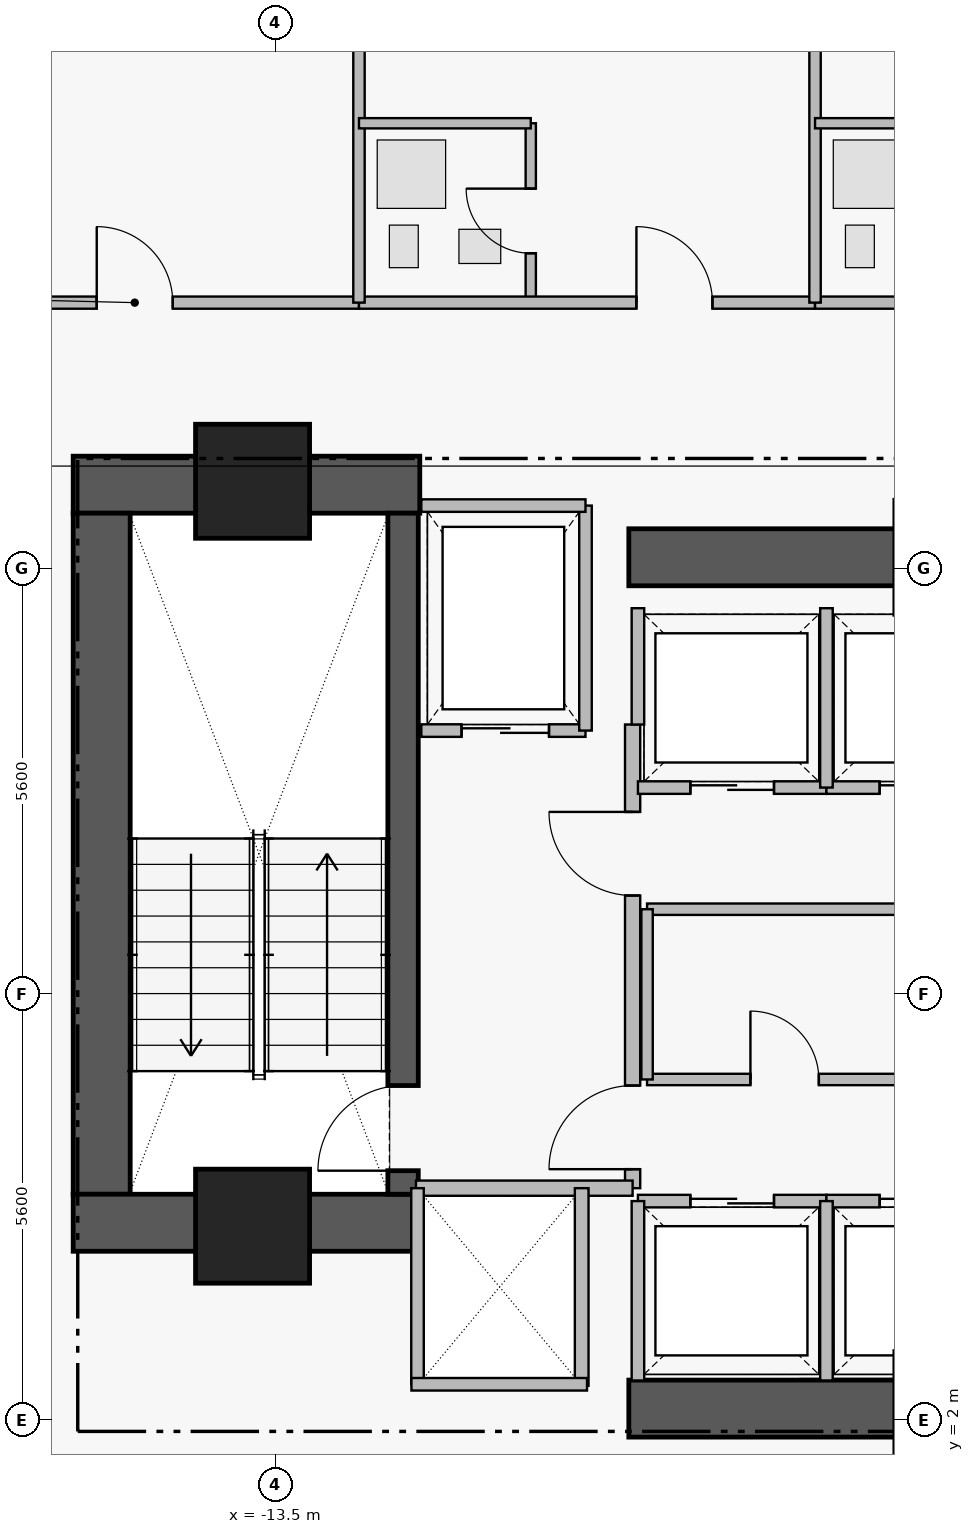
"""IFC4 building model, lengths in metres.
Left out: names, types, materials, properties, quantities, classifications, styles, units other than length and angle.
Written with IfcOpenShell. Run it as: python <this file> out.ifc"""

import sys

from ifc_helpers import new_model, si_unit, direction, frame, frame_2d, origin, origin_2d, place, context, subcontext, project, spatial, rectangle, extrude, element, fill, save


model = new_model("IFC4")
c1 = context("Model", 3, precision=1e-05, world=origin(), true_north=direction((0.0, 1.0)))
c2 = subcontext(c1, "Body", "Model", "MODEL_VIEW")
j1 = project(units=[si_unit("LENGTHUNIT", "METRE"), si_unit("PLANEANGLEUNIT", "RADIAN")], contexts=[c1])
p1 = place(None, origin())
s1 = spatial("IfcSite", under=j1, at=p1, CompositionType="ELEMENT")
p2 = place(p1, origin())
s2 = spatial("IfcBuilding", under=s1, at=p2, CompositionType="ELEMENT")
p3 = place(p2, frame((0.0, 0.0, 95.65)))
s3 = spatial("IfcBuildingStorey", under=s2, at=p3, CompositionType="ELEMENT", Elevation=95.65)
p4 = place(p3, frame((-16.16, 14.305, 0.0), z_axis=(0.0, 0.0, 1.0), x_axis=(1.0, 0.0, 0.0)))
e1 = element("IfcWall", 1, at=p4, inside=s3, PredefinedType="SHEAR", context=c2, shape_type="SweptSolid", body=[
    extrude(rectangle(XDim=4.56, YDim=0.75, at=frame_2d((2.28, 0.0))), origin(), (0.0, 0.0, 1.0), 3.46),
])
p5 = place(p3, frame((-15.785, 4.97, 0.0), z_axis=(0.0, 0.0, 1.0), x_axis=(0.0, 1.0, 0.0)))
e2 = element("IfcWall", 2, at=p5, inside=s3, PredefinedType="SHEAR", context=c2, shape_type="SweptSolid", body=[
    extrude(rectangle(XDim=8.96, YDim=0.75, at=frame_2d((4.48, 0.0))), origin(), (0.0, 0.0, 1.0), 3.46),
])
p6 = place(p3, frame((-16.16, 4.595, 0.0), z_axis=(0.0, 0.0, 1.0), x_axis=(1.0, 0.0, 0.0)))
e3 = element("IfcWall", 3, at=p6, inside=s3, PredefinedType="SHEAR", context=c2, shape_type="SweptSolid", body=[
    extrude(rectangle(XDim=4.56, YDim=0.75, at=frame_2d((2.28, 0.0))), origin(), (0.0, 0.0, 1.0), 3.46),
])
for number, where, z_axis, x_axis in (
    (4, (-8.85, 2.15, 0.0), (0.0, 0.0, 1.0), (1.0, 0.0, 0.0)),
    (5, (-8.85, 13.35, 0.0), (0.0, 0.0, 1.0), (1.0, 0.0, 0.0)),
):
    element("IfcWall", number, at=place(p3, frame(where, z_axis=z_axis, x_axis=x_axis)), inside=s3, PredefinedType="SHEAR", context=c2, shape_type="SweptSolid", body=[
        extrude(rectangle(XDim=7.6, YDim=0.75, at=frame_2d((3.8, 0.0))), origin(), (0.0, 0.0, 1.0), 3.43),
    ])
p7 = place(p3, frame((-11.82, 4.97, 0.0), z_axis=(0.0, 0.0, 1.0), x_axis=(0.0, 1.0, 0.0)))
e6 = element("IfcWall", 6, at=p7, inside=s3, PredefinedType="SHEAR", context=c2, shape_type="SweptSolid", body=[
    extrude(rectangle(XDim=8.96, YDim=0.4, at=frame_2d((4.48, 0.0))), origin(), (0.0, 0.0, 1.0), 3.46),
])
p8 = place(p7, frame((0.31, 0.0, 0.0)))
e7 = element("IfcOpeningElement", 7, at=p8, cuts=e6, PredefinedType="OPENING", context=c2, shape_type="SweptSolid", body=[
    extrude(rectangle(XDim=1.12, YDim=2.22, at=frame_2d((0.56, 1.11))), frame((0.0, 0.21, 0.0), z_axis=(0.0, -1.0, 0.0), x_axis=(1.0, 0.0, 0.0)), (0.0, 0.0, 1.0), 0.42),
])
for number, where, z_axis, x_axis in (
    (8, (-13.8, 14.35, 0.0), (0.0, 0.0, 1.0), (1.0, 0.0, 0.0)),
    (9, (-13.8, 4.55, 0.0), (0.0, 0.0, 1.0), (1.0, 0.0, 0.0)),
):
    element("IfcColumn", number, at=place(p3, frame(where, z_axis=z_axis, x_axis=x_axis)), inside=s3, PredefinedType="COLUMN", context=c2, shape_type="SweptSolid", body=[
        extrude(rectangle(XDim=1.5, YDim=1.5, at=origin_2d()), origin(), (0.0, 0.0, 1.0), 3.65),
    ])
p9 = place(p3, frame((-8.8, 5.05, 0.0), z_axis=(0.0, 0.0, 1.0), x_axis=(0.0, 1.0, 0.0)))
e10 = element("IfcWall", 10, at=p9, inside=s3, PredefinedType="PARTITIONING", context=c2, shape_type="SweptSolid", body=[
    extrude(rectangle(XDim=6.1, YDim=0.2, at=frame_2d((3.05, 0.0))), origin(), (0.0, 0.0, 1.0), 3.43),
])
p10 = place(p9, frame((0.25, 0.0, 0.0)))
e11 = element("IfcOpeningElement", 11, at=p10, cuts=e10, PredefinedType="OPENING", context=c2, shape_type="SweptSolid", body=[
    extrude(rectangle(XDim=1.1, YDim=2.2, at=frame_2d((0.55, 1.1))), frame((0.0, 0.11, 0.0), z_axis=(0.0, -1.0, 0.0), x_axis=(1.0, 0.0, 0.0)), (0.0, 0.0, 1.0), 0.22),
])
p11 = place(p9, frame((3.85, 0.0, 0.0)))
e12 = element("IfcOpeningElement", 12, at=p11, cuts=e10, PredefinedType="OPENING", context=c2, shape_type="SweptSolid", body=[
    extrude(rectangle(XDim=1.1, YDim=2.2, at=frame_2d((0.55, 1.1))), frame((0.0, 0.11, 0.0), z_axis=(0.0, -1.0, 0.0), x_axis=(1.0, 0.0, 0.0)), (0.0, 0.0, 1.0), 0.22),
])
p12 = place(p3, frame((-11.58, 11.07, 0.0), z_axis=(0.0, 0.0, 1.0), x_axis=(1.0, 0.0, 0.0)))
e13 = element("IfcWall", 13, at=p12, inside=s3, PredefinedType="PARTITIONING", context=c2, shape_type="SweptSolid", body=[
    extrude(rectangle(XDim=2.16, YDim=0.165, at=frame_2d((1.08, 0.0))), origin(), (0.0, 0.0, 1.0), 3.43),
])
p13 = place(p12, frame((0.53, 0.0, 0.0)))
e14 = element("IfcOpeningElement", 14, at=p13, cuts=e13, PredefinedType="OPENING", context=c2, shape_type="SweptSolid", body=[
    extrude(rectangle(XDim=1.15, YDim=2.25, at=frame_2d((0.575, 1.125))), frame((0.0, 0.093, 0.0), z_axis=(0.0, -1.0, 0.0), x_axis=(1.0, 0.0, 0.0)), (0.0, 0.0, 1.0), 0.185),
])
p14 = place(p3, frame((-8.73, 4.88, 0.0), z_axis=(0.0, 0.0, 1.0), x_axis=(1.0, 0.0, 0.0)))
e15 = element("IfcWall", 15, at=p14, inside=s3, PredefinedType="PARTITIONING", context=c2, shape_type="SweptSolid", body=[
    extrude(rectangle(XDim=2.48, YDim=0.165, at=frame_2d((1.24, 0.0))), origin(), (0.0, 0.0, 1.0), 3.43),
])
p15 = place(p14, frame((0.69, 0.0, 0.0)))
e16 = element("IfcOpeningElement", 16, at=p15, cuts=e15, PredefinedType="OPENING", context=c2, shape_type="SweptSolid", body=[
    extrude(rectangle(XDim=1.1, YDim=2.25, at=frame_2d((0.55, 1.125))), frame((0.0, 0.093, 0.0), z_axis=(0.0, -1.0, 0.0), x_axis=(1.0, 0.0, 0.0)), (0.0, 0.0, 1.0), 0.185),
])
p16 = place(p3, frame((-6.25, 4.88, 0.0), z_axis=(0.0, 0.0, 1.0), x_axis=(1.0, 0.0, 0.0)))
e17 = element("IfcWall", 17, at=p16, inside=s3, PredefinedType="PARTITIONING", context=c2, shape_type="SweptSolid", body=[
    extrude(rectangle(XDim=2.5, YDim=0.165, at=frame_2d((1.25, 0.0))), origin(), (0.0, 0.0, 1.0), 3.43),
])
p17 = place(p16, frame((0.7, 0.0, 0.0)))
e18 = element("IfcOpeningElement", 18, at=p17, cuts=e17, PredefinedType="OPENING", context=c2, shape_type="SweptSolid", body=[
    extrude(rectangle(XDim=1.1, YDim=2.25, at=frame_2d((0.55, 1.125))), frame((0.0, 0.093, 0.0), z_axis=(0.0, -1.0, 0.0), x_axis=(1.0, 0.0, 0.0)), (0.0, 0.0, 1.0), 0.185),
])
p18 = place(p3, frame((-8.73, 10.32, 0.0), z_axis=(0.0, 0.0, 1.0), x_axis=(1.0, 0.0, 0.0)))
e19 = element("IfcWall", 19, at=p18, inside=s3, PredefinedType="PARTITIONING", context=c2, shape_type="SweptSolid", body=[
    extrude(rectangle(XDim=2.48, YDim=0.165, at=frame_2d((1.24, 0.0))), origin(), (0.0, 0.0, 1.0), 3.43),
])
p19 = place(p18, frame((0.69, 0.0, 0.0)))
e20 = element("IfcOpeningElement", 20, at=p19, cuts=e19, PredefinedType="OPENING", context=c2, shape_type="SweptSolid", body=[
    extrude(rectangle(XDim=1.1, YDim=2.25, at=frame_2d((0.55, 1.125))), frame((0.0, 0.093, 0.0), z_axis=(0.0, -1.0, 0.0), x_axis=(1.0, 0.0, 0.0)), (0.0, 0.0, 1.0), 0.185),
])
p20 = place(p3, frame((-6.25, 10.32, 0.0), z_axis=(0.0, 0.0, 1.0), x_axis=(1.0, 0.0, 0.0)))
e21 = element("IfcWall", 21, at=p20, inside=s3, PredefinedType="PARTITIONING", context=c2, shape_type="SweptSolid", body=[
    extrude(rectangle(XDim=2.5, YDim=0.165, at=frame_2d((1.25, 0.0))), origin(), (0.0, 0.0, 1.0), 3.43),
])
p21 = place(p20, frame((0.7, 0.0, 0.0)))
e22 = element("IfcOpeningElement", 22, at=p21, cuts=e21, PredefinedType="OPENING", context=c2, shape_type="SweptSolid", body=[
    extrude(rectangle(XDim=1.1, YDim=2.25, at=frame_2d((0.55, 1.125))), frame((0.0, 0.093, 0.0), z_axis=(0.0, -1.0, 0.0), x_axis=(1.0, 0.0, 0.0)), (0.0, 0.0, 1.0), 0.185),
])
p22 = place(p3, frame((-8.61, 6.48, 0.0), z_axis=(0.0, 0.0, 1.0), x_axis=(1.0, 0.0, 0.0)))
e23 = element("IfcWall", 23, at=p22, inside=s3, PredefinedType="PARTITIONING", context=c2, shape_type="SweptSolid", body=[
    extrude(rectangle(XDim=3.62, YDim=0.15, at=frame_2d((1.81, 0.0))), origin(), (0.0, 0.0, 1.0), 3.43),
])
p23 = place(p22, frame((1.36, 0.0, 0.0)))
e24 = element("IfcOpeningElement", 24, at=p23, cuts=e23, PredefinedType="OPENING", context=c2, shape_type="SweptSolid", body=[
    extrude(rectangle(XDim=0.9, YDim=2.15, at=frame_2d((0.45, 1.075))), frame((0.0, 0.085, 0.0), z_axis=(0.0, -1.0, 0.0), x_axis=(1.0, 0.0, 0.0)), (0.0, 0.0, 1.0), 0.17),
])
p24 = place(p3, frame((-20.6, 16.7, 0.0), z_axis=(0.0, 0.0, 1.0), x_axis=(1.0, 0.0, 0.0)))
e25 = element("IfcWall", 25, at=p24, inside=s3, PredefinedType="PARTITIONING", context=c2, shape_type="SweptSolid", body=[
    extrude(rectangle(XDim=8.2, YDim=0.16, at=frame_2d((4.1, 0.0))), origin(), (0.0, 0.0, 1.0), 2.973),
])
p25 = place(p24, frame((4.75, 0.0, 0.0)))
e26 = element("IfcOpeningElement", 26, at=p25, cuts=e25, PredefinedType="OPENING", context=c2, shape_type="SweptSolid", body=[
    extrude(rectangle(XDim=1.0, YDim=2.15, at=frame_2d((0.5, 1.075))), frame((0.0, 0.09, 0.0), z_axis=(0.0, -1.0, 0.0), x_axis=(1.0, 0.0, 0.0)), (0.0, 0.0, 1.0), 0.18),
])
p26 = place(p3, frame((-10.14, 16.7, 0.0), z_axis=(0.0, 0.0, 1.0), x_axis=(0.0, 1.0, 0.0)))
e27 = element("IfcWall", 27, at=p26, inside=s3, PredefinedType="PLUMBINGWALL", context=c2, shape_type="SweptSolid", body=[
    extrude(rectangle(XDim=2.36, YDim=0.135, at=frame_2d((1.18, 0.0))), origin(), (0.0, 0.0, 1.0), 3.43),
])
p27 = place(p26, frame((0.65, 0.0, 0.0)))
e28 = element("IfcOpeningElement", 28, at=p27, cuts=e27, PredefinedType="OPENING", context=c2, shape_type="SweptSolid", body=[
    extrude(rectangle(XDim=0.85, YDim=2.1, at=frame_2d((0.425, 1.05))), frame((0.0, 0.077, 0.0), z_axis=(0.0, -1.0, 0.0), x_axis=(1.0, 0.0, 0.0)), (0.0, 0.0, 1.0), 0.155),
])
p28 = place(p3, frame((-12.4, 16.7, 0.0), z_axis=(0.0, 0.0, 1.0), x_axis=(1.0, 0.0, 0.0)))
e29 = element("IfcWall", 29, at=p28, inside=s3, PredefinedType="PARTITIONING", context=c2, shape_type="SweptSolid", body=[
    extrude(rectangle(XDim=6.0, YDim=0.16, at=frame_2d((3.0, 0.0))), origin(), (0.0, 0.0, 1.0), 2.973),
])
p29 = place(p28, frame((3.65, 0.0, 0.0)))
e30 = element("IfcOpeningElement", 30, at=p29, cuts=e29, PredefinedType="OPENING", context=c2, shape_type="SweptSolid", body=[
    extrude(rectangle(XDim=1.0, YDim=2.15, at=frame_2d((0.5, 1.075))), frame((0.0, 0.09, 0.0), z_axis=(0.0, -1.0, 0.0), x_axis=(1.0, 0.0, 0.0)), (0.0, 0.0, 1.0), 0.18),
])
p30 = place(p3, frame((-6.4, 16.7, 0.0), z_axis=(0.0, 0.0, 1.0), x_axis=(1.0, 0.0, 0.0)))
e31 = element("IfcWall", 31, at=p30, inside=s3, PredefinedType="PARTITIONING", context=c2, shape_type="SweptSolid", body=[
    extrude(rectangle(XDim=6.0, YDim=0.16, at=frame_2d((3.0, 0.0))), origin(), (0.0, 0.0, 1.0), 2.973),
])
p31 = place(p30, frame((3.65, 0.0, 0.0)))
e32 = element("IfcOpeningElement", 32, at=p31, cuts=e31, PredefinedType="OPENING", context=c2, shape_type="SweptSolid", body=[
    extrude(rectangle(XDim=1.0, YDim=2.15, at=frame_2d((0.5, 1.075))), frame((0.0, 0.09, 0.0), z_axis=(0.0, -1.0, 0.0), x_axis=(1.0, 0.0, 0.0)), (0.0, 0.0, 1.0), 0.18),
])
p32 = place(p3, frame((-11.65, 5.05, 0.0), z_axis=(0.0, 0.0, 1.0), x_axis=(1.0, 0.0, 0.0)))
e33 = element("IfcWall", 33, at=p32, inside=s3, PredefinedType="PARTITIONING", context=c2, shape_type="SweptSolid", body=[
    extrude(rectangle(XDim=2.85, YDim=0.2, at=frame_2d((1.425, 0.0))), origin(), (0.0, 0.0, 1.0), 3.43),
])
p33 = place(p3, frame((-9.42, 11.07, 0.0), z_axis=(0.0, 0.0, 1.0), x_axis=(0.0, 1.0, 0.0)))
e34 = element("IfcWall", 34, at=p33, inside=s3, PredefinedType="PARTITIONING", context=c2, shape_type="SweptSolid", body=[
    extrude(rectangle(XDim=2.96, YDim=0.165, at=frame_2d((1.48, 0.0))), origin(), (0.0, 0.0, 1.0), 3.43),
])
p34 = place(p3, frame((-11.58, 14.03, 0.0), z_axis=(0.0, 0.0, 1.0), x_axis=(1.0, 0.0, 0.0)))
e35 = element("IfcWall", 35, at=p34, inside=s3, PredefinedType="PARTITIONING", context=c2, shape_type="SweptSolid", body=[
    extrude(rectangle(XDim=2.16, YDim=0.165, at=frame_2d((1.08, 0.0))), origin(), (0.0, 0.0, 1.0), 3.43),
])
for number, where, z_axis, x_axis in (
    (36, (-8.73, 2.52, 0.0), (0.0, 0.0, 1.0), (0.0, 1.0, 0.0)),
    (37, (-6.25, 2.52, 0.0), (0.0, 0.0, 1.0), (0.0, 1.0, 0.0)),
):
    element("IfcWall", number, at=place(p3, frame(where, z_axis=z_axis, x_axis=x_axis)), inside=s3, PredefinedType="PARTITIONING", context=c2, shape_type="SweptSolid", body=[
        extrude(rectangle(XDim=2.36, YDim=0.165, at=frame_2d((1.18, 0.0))), origin(), (0.0, 0.0, 1.0), 3.43),
    ])
p35 = place(p3, frame((-8.73, 11.15, 0.0), z_axis=(0.0, 0.0, 1.0), x_axis=(0.0, 1.0, 0.0)))
e38 = element("IfcWall", 38, at=p35, inside=s3, PredefinedType="PARTITIONING", context=c2, shape_type="SweptSolid", body=[
    extrude(rectangle(XDim=1.53, YDim=0.165, at=frame_2d((0.765, 0.0))), origin(), (0.0, 0.0, 1.0), 3.43),
])
p36 = place(p3, frame((-6.25, 10.32, 0.0), z_axis=(0.0, 0.0, 1.0), x_axis=(0.0, 1.0, 0.0)))
e39 = element("IfcWall", 39, at=p36, inside=s3, PredefinedType="PARTITIONING", context=c2, shape_type="SweptSolid", body=[
    extrude(rectangle(XDim=2.36, YDim=0.165, at=frame_2d((1.18, 0.0))), origin(), (0.0, 0.0, 1.0), 3.43),
])
p37 = place(p3, frame((-9.47, 2.45, 0.0), z_axis=(0.0, 0.0, 1.0), x_axis=(0.0, 1.0, 0.0)))
e40 = element("IfcWall", 40, at=p37, inside=s3, PredefinedType="PARTITIONING", context=c2, shape_type="SweptSolid", body=[
    extrude(rectangle(XDim=2.6, YDim=0.18, at=frame_2d((1.3, 0.0))), origin(), (0.0, 0.0, 1.0), 3.43),
])
p38 = place(p3, frame((-11.63, 2.47, 0.0), z_axis=(0.0, 0.0, 1.0), x_axis=(0.0, 1.0, 0.0)))
e41 = element("IfcWall", 41, at=p38, inside=s3, PredefinedType="PARTITIONING", context=c2, shape_type="SweptSolid", body=[
    extrude(rectangle(XDim=2.58, YDim=0.165, at=frame_2d((1.29, 0.0))), origin(), (0.0, 0.0, 1.0), 3.43),
])
p39 = place(p3, frame((-11.71, 2.47, 0.0), z_axis=(0.0, 0.0, 1.0), x_axis=(1.0, 0.0, 0.0)))
e42 = element("IfcWall", 42, at=p39, inside=s3, PredefinedType="PARTITIONING", context=c2, shape_type="SweptSolid", body=[
    extrude(rectangle(XDim=2.31, YDim=0.165, at=frame_2d((1.155, 0.0))), origin(), (0.0, 0.0, 1.0), 2.03),
])
p40 = place(p3, frame((-8.61, 8.72, 0.0), z_axis=(0.0, 0.0, 1.0), x_axis=(1.0, 0.0, 0.0)))
e43 = element("IfcWall", 43, at=p40, inside=s3, PredefinedType="PARTITIONING", context=c2, shape_type="SweptSolid", body=[
    extrude(rectangle(XDim=3.62, YDim=0.15, at=frame_2d((1.81, 0.0))), origin(), (0.0, 0.0, 1.0), 3.43),
])
p41 = place(p3, frame((-8.61, 6.48, 0.0), z_axis=(0.0, 0.0, 1.0), x_axis=(0.0, 1.0, 0.0)))
e44 = element("IfcWall", 44, at=p41, inside=s3, PredefinedType="PARTITIONING", context=c2, shape_type="SweptSolid", body=[
    extrude(rectangle(XDim=2.24, YDim=0.15, at=frame_2d((1.12, 0.0))), origin(), (0.0, 0.0, 1.0), 3.43),
])
p42 = place(p3, frame((-12.4, 16.7, 0.0), z_axis=(0.0, 0.0, 1.0), x_axis=(0.0, 1.0, 0.0)))
e45 = element("IfcWall", 45, at=p42, inside=s3, PredefinedType="PARTITIONING", context=c2, shape_type="SweptSolid", body=[
    extrude(rectangle(XDim=11.62, YDim=0.15, at=frame_2d((5.81, 0.0))), origin(), (0.0, 0.0, 1.0), 3.43),
])
p43 = place(p3, frame((-12.4, 19.06, 0.0), z_axis=(0.0, 0.0, 1.0), x_axis=(1.0, 0.0, 0.0)))
e46 = element("IfcWall", 46, at=p43, inside=s3, PredefinedType="PLUMBINGWALL", context=c2, shape_type="SweptSolid", body=[
    extrude(rectangle(XDim=2.26, YDim=0.135, at=frame_2d((1.13, 0.0))), origin(), (0.0, 0.0, 1.0), 2.973),
])
p44 = place(p3, frame((-6.4, 16.7, 0.0), z_axis=(0.0, 0.0, 1.0), x_axis=(0.0, 1.0, 0.0)))
e47 = element("IfcWall", 47, at=p44, inside=s3, PredefinedType="PARTITIONING", context=c2, shape_type="SweptSolid", body=[
    extrude(rectangle(XDim=11.62, YDim=0.15, at=frame_2d((5.81, 0.0))), origin(), (0.0, 0.0, 1.0), 3.43),
])
p45 = place(p3, frame((-6.4, 19.06, 0.0), z_axis=(0.0, 0.0, 1.0), x_axis=(1.0, 0.0, 0.0)))
e48 = element("IfcWall", 48, at=p45, inside=s3, PredefinedType="PLUMBINGWALL", context=c2, shape_type="SweptSolid", body=[
    extrude(rectangle(XDim=2.26, YDim=0.135, at=frame_2d((1.13, 0.0))), origin(), (0.0, 0.0, 1.0), 2.973),
])
p46 = place(p8, origin())
e49 = element("IfcDoor", 49, at=p46, inside=s3, OperationType="SINGLE_SWING_LEFT", PredefinedType="DOOR", context=c2, shape_type="SweptSolid", body=[
    extrude(rectangle(XDim=1.12, YDim=2.22, at=frame_2d((0.56, 1.11))), frame((0.0, 0.025, 0.0), z_axis=(0.0, -1.0, 0.0), x_axis=(1.0, 0.0, 0.0)), (0.0, 0.0, 1.0), 0.05),
])
fill(e7, e49)
p47 = place(p10, origin())
e50 = element("IfcDoor", 50, at=p47, inside=s3, OperationType="SINGLE_SWING_LEFT", PredefinedType="DOOR", context=c2, shape_type="SweptSolid", body=[
    extrude(rectangle(XDim=1.1, YDim=2.2, at=frame_2d((0.55, 1.1))), frame((0.0, 0.025, 0.0), z_axis=(0.0, -1.0, 0.0), x_axis=(1.0, 0.0, 0.0)), (0.0, 0.0, 1.0), 0.05),
])
fill(e11, e50)
p48 = place(p11, origin())
e51 = element("IfcDoor", 51, at=p48, inside=s3, OperationType="SINGLE_SWING_RIGHT", PredefinedType="DOOR", context=c2, shape_type="SweptSolid", body=[
    extrude(rectangle(XDim=1.1, YDim=2.2, at=frame_2d((0.55, 1.1))), frame((0.0, 0.025, 0.0), z_axis=(0.0, -1.0, 0.0), x_axis=(1.0, 0.0, 0.0)), (0.0, 0.0, 1.0), 0.05),
])
fill(e12, e51)
p49 = place(p13, origin())
e52 = element("IfcDoor", 52, at=p49, inside=s3, OperationType="SLIDING_TO_LEFT", PredefinedType="DOOR", context=c2, shape_type="SweptSolid", body=[
    extrude(rectangle(XDim=1.15, YDim=2.25, at=frame_2d((0.575, 1.125))), frame((0.0, 0.025, 0.0), z_axis=(0.0, -1.0, 0.0), x_axis=(1.0, 0.0, 0.0)), (0.0, 0.0, 1.0), 0.05),
])
fill(e14, e52)
p50 = place(p15, origin())
e53 = element("IfcDoor", 53, at=p50, inside=s3, OperationType="SLIDING_TO_LEFT", PredefinedType="DOOR", context=c2, shape_type="SweptSolid", body=[
    extrude(rectangle(XDim=1.1, YDim=2.25, at=frame_2d((0.55, 1.125))), frame((0.0, 0.025, 0.0), z_axis=(0.0, -1.0, 0.0), x_axis=(1.0, 0.0, 0.0)), (0.0, 0.0, 1.0), 0.05),
])
fill(e16, e53)
p51 = place(p17, origin())
e54 = element("IfcDoor", 54, at=p51, inside=s3, OperationType="SLIDING_TO_LEFT", PredefinedType="DOOR", context=c2, shape_type="SweptSolid", body=[
    extrude(rectangle(XDim=1.1, YDim=2.25, at=frame_2d((0.55, 1.125))), frame((0.0, 0.025, 0.0), z_axis=(0.0, -1.0, 0.0), x_axis=(1.0, 0.0, 0.0)), (0.0, 0.0, 1.0), 0.05),
])
fill(e18, e54)
p52 = place(p19, origin())
e55 = element("IfcDoor", 55, at=p52, inside=s3, OperationType="SLIDING_TO_LEFT", PredefinedType="DOOR", context=c2, shape_type="SweptSolid", body=[
    extrude(rectangle(XDim=1.1, YDim=2.25, at=frame_2d((0.55, 1.125))), frame((0.0, 0.025, 0.0), z_axis=(0.0, -1.0, 0.0), x_axis=(1.0, 0.0, 0.0)), (0.0, 0.0, 1.0), 0.05),
])
fill(e20, e55)
p53 = place(p21, origin())
e56 = element("IfcDoor", 56, at=p53, inside=s3, OperationType="SLIDING_TO_LEFT", PredefinedType="DOOR", context=c2, shape_type="SweptSolid", body=[
    extrude(rectangle(XDim=1.1, YDim=2.25, at=frame_2d((0.55, 1.125))), frame((0.0, 0.025, 0.0), z_axis=(0.0, -1.0, 0.0), x_axis=(1.0, 0.0, 0.0)), (0.0, 0.0, 1.0), 0.05),
])
fill(e22, e56)
p54 = place(p23, origin())
e57 = element("IfcDoor", 57, at=p54, inside=s3, OperationType="SINGLE_SWING_LEFT", PredefinedType="DOOR", context=c2, shape_type="SweptSolid", body=[
    extrude(rectangle(XDim=0.9, YDim=2.15, at=frame_2d((0.45, 1.075))), frame((0.0, 0.025, 0.0), z_axis=(0.0, -1.0, 0.0), x_axis=(1.0, 0.0, 0.0)), (0.0, 0.0, 1.0), 0.05),
])
fill(e24, e57)
p55 = place(p25, origin())
e58 = element("IfcDoor", 58, at=p55, inside=s3, OperationType="SINGLE_SWING_LEFT", PredefinedType="DOOR", context=c2, shape_type="SweptSolid", body=[
    extrude(rectangle(XDim=1.0, YDim=2.15, at=frame_2d((0.5, 1.075))), frame((0.0, 0.025, 0.0), z_axis=(0.0, -1.0, 0.0), x_axis=(1.0, 0.0, 0.0)), (0.0, 0.0, 1.0), 0.05),
])
fill(e26, e58)
p56 = place(p27, origin())
e59 = element("IfcDoor", 59, at=p56, inside=s3, OperationType="SINGLE_SWING_RIGHT", PredefinedType="DOOR", context=c2, shape_type="SweptSolid", body=[
    extrude(rectangle(XDim=0.85, YDim=2.1, at=frame_2d((0.425, 1.05))), frame((0.0, 0.025, 0.0), z_axis=(0.0, -1.0, 0.0), x_axis=(1.0, 0.0, 0.0)), (0.0, 0.0, 1.0), 0.05),
])
fill(e28, e59)
p57 = place(p29, origin())
e60 = element("IfcDoor", 60, at=p57, inside=s3, OperationType="SINGLE_SWING_LEFT", PredefinedType="DOOR", context=c2, shape_type="SweptSolid", body=[
    extrude(rectangle(XDim=1.0, YDim=2.15, at=frame_2d((0.5, 1.075))), frame((0.0, 0.025, 0.0), z_axis=(0.0, -1.0, 0.0), x_axis=(1.0, 0.0, 0.0)), (0.0, 0.0, 1.0), 0.05),
])
fill(e30, e60)
save(model, sys.argv[1])
